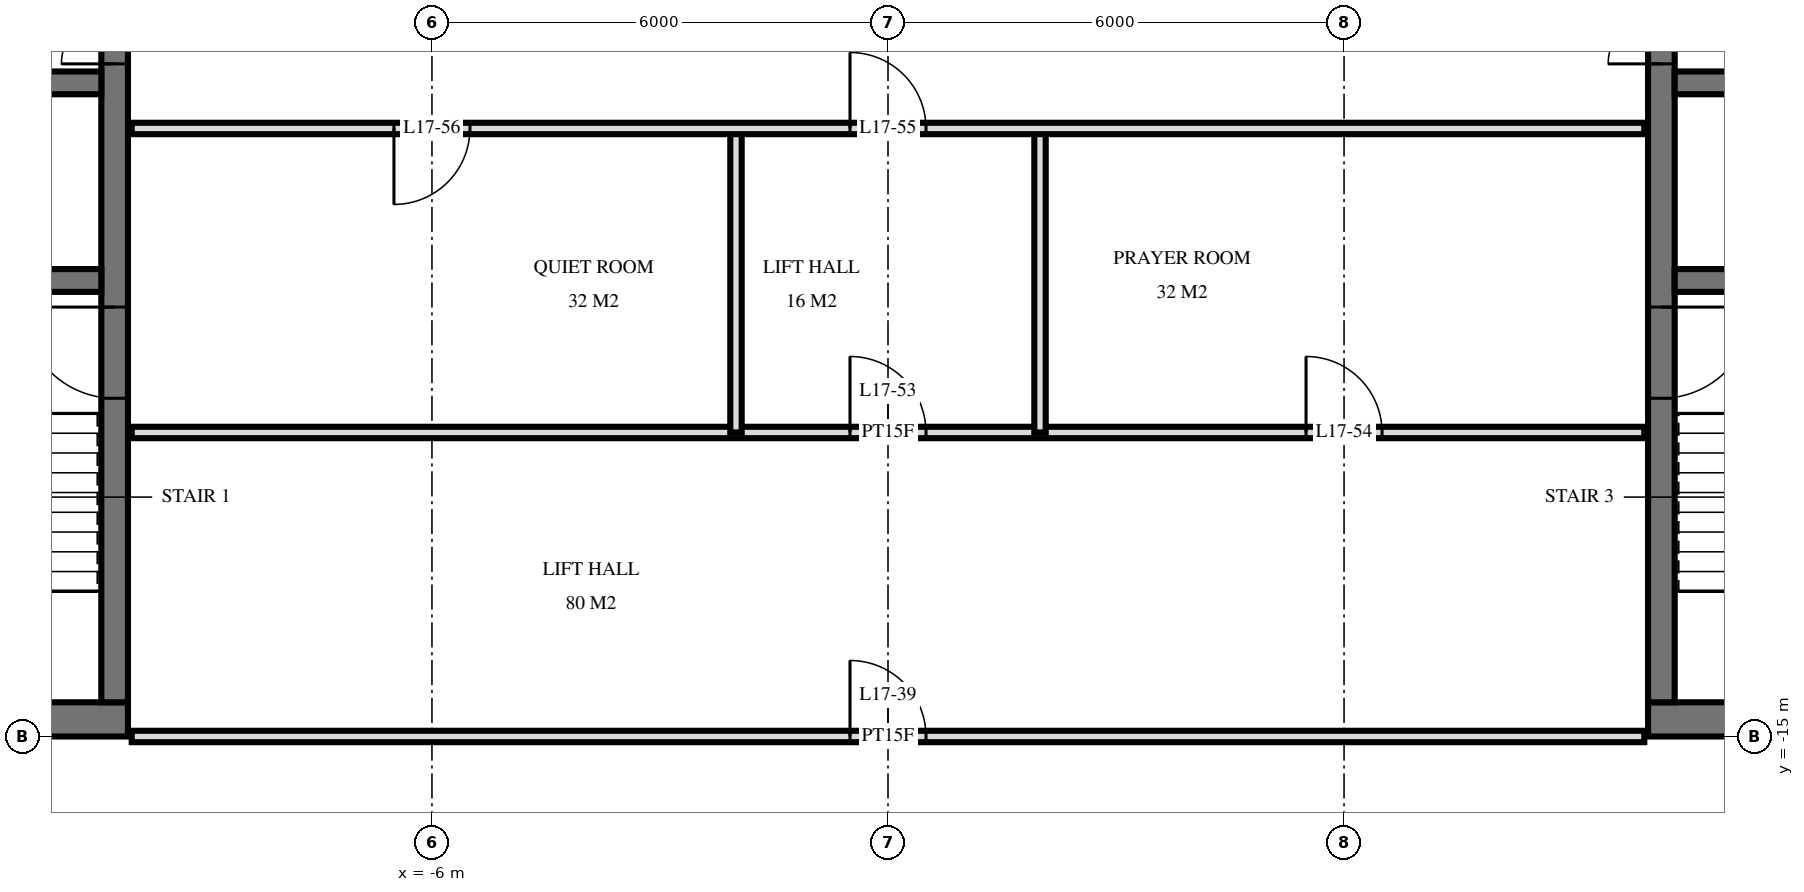
"""IFC4 building model, lengths in metres.
Left out: names, types, materials, properties, quantities, classifications, styles, units other than length and angle.
Written with IfcOpenShell. Run it as: python <this file> out.ifc"""

import sys

from ifc_helpers import new_model, si_unit, direction, frame, frame_2d, origin, place, context, subcontext, project, spatial, rectangle, extrude, element, fill, save


model = new_model("IFC4")
c1 = context("Model", 3, precision=1e-05, world=origin(), true_north=direction((0.0, 1.0)))
c2 = subcontext(c1, "Body", "Model", "MODEL_VIEW")
j1 = project(units=[si_unit("LENGTHUNIT", "METRE"), si_unit("PLANEANGLEUNIT", "RADIAN")], contexts=[c1])
p1 = place(None, origin())
s1 = spatial("IfcSite", under=j1, at=p1, CompositionType="ELEMENT")
p2 = place(p1, origin())
s2 = spatial("IfcBuilding", under=s1, at=p2, CompositionType="ELEMENT")
p3 = place(p2, frame((0.0, 0.0, 70.8)))
s3 = spatial("IfcBuildingStorey", under=s2, at=p3, CompositionType="ELEMENT", Elevation=70.8)
p4 = place(p3, frame((-29.5, -14.775, 0.0), z_axis=(0.0, 0.0, 1.0), x_axis=(1.0, 0.0, 0.0)))
e1 = element("IfcWall", 1, at=p4, inside=s3, PredefinedType="SHEAR", context=c2, shape_type="SweptSolid", body=[
    extrude(rectangle(XDim=19.5, YDim=0.45, at=frame_2d((9.75, 0.0))), origin(), (0.0, 0.0, 1.0), 3.6),
])
p5 = place(p4, frame((11.2, 0.0, 0.0)))
e2 = element("IfcOpeningElement", 2, at=p5, cuts=e1, PredefinedType="OPENING", context=c2, shape_type="SweptSolid", body=[
    extrude(rectangle(XDim=1.2, YDim=2.1, at=frame_2d((0.6, 1.05))), frame((0.0, 0.235, 0.0), z_axis=(0.0, -1.0, 0.0), x_axis=(1.0, 0.0, 0.0)), (0.0, 0.0, 1.0), 0.47),
])
p6 = place(p4, frame((14.25, 0.0, 0.0)))
e3 = element("IfcOpeningElement", 3, at=p6, cuts=e1, PredefinedType="OPENING", context=c2, shape_type="SweptSolid", body=[
    extrude(rectangle(XDim=1.1, YDim=2.1, at=frame_2d((0.55, 1.05))), frame((0.0, 0.235, 0.0), z_axis=(0.0, -1.0, 0.0), x_axis=(1.0, 0.0, 0.0)), (0.0, 0.0, 1.0), 0.47),
])
p7 = place(p4, frame((8.5, 0.0, 0.0)))
e4 = element("IfcOpeningElement", 4, at=p7, cuts=e1, PredefinedType="OPENING", context=c2, shape_type="SweptSolid", body=[
    extrude(rectangle(XDim=0.9, YDim=2.1, at=frame_2d((0.45, 1.05))), frame((0.0, 0.235, 0.0), z_axis=(0.0, -1.0, 0.0), x_axis=(1.0, 0.0, 0.0)), (0.0, 0.0, 1.0), 0.47),
])
p8 = place(p4, frame((6.05, 0.0, 0.0)))
e5 = element("IfcOpeningElement", 5, at=p8, cuts=e1, PredefinedType="OPENING", context=c2, shape_type="SweptSolid", body=[
    extrude(rectangle(XDim=1.0, YDim=2.1, at=frame_2d((0.5, 1.05))), frame((0.0, 0.235, 0.0), z_axis=(0.0, -1.0, 0.0), x_axis=(1.0, 0.0, 0.0)), (0.0, 0.0, 1.0), 0.47),
])
p9 = place(p4, frame((2.25, 0.0, 0.0)))
e6 = element("IfcOpeningElement", 6, at=p9, cuts=e1, PredefinedType="OPENING", context=c2, shape_type="SweptSolid", body=[
    extrude(rectangle(XDim=1.0, YDim=2.1, at=frame_2d((0.5, 1.05))), frame((0.0, 0.235, 0.0), z_axis=(0.0, -1.0, 0.0), x_axis=(1.0, 0.0, 0.0)), (0.0, 0.0, 1.0), 0.47),
])
p10 = place(p3, frame((-10.175, -14.55, 0.0), z_axis=(0.0, 0.0, 1.0), x_axis=(0.0, 1.0, 0.0)))
e7 = element("IfcWall", 7, at=p10, inside=s3, PredefinedType="SHEAR", context=c2, shape_type="SweptSolid", body=[
    extrude(rectangle(XDim=14.1, YDim=0.35, at=frame_2d((7.05, 0.0))), origin(), (0.0, 0.0, 1.0), 3.6),
])
p11 = place(p10, frame((8.4, 0.0, 0.0)))
e8 = element("IfcOpeningElement", 8, at=p11, cuts=e7, PredefinedType="OPENING", context=c2, shape_type="SweptSolid", body=[
    extrude(rectangle(XDim=1.4, YDim=2.4, at=frame_2d((0.7, 1.2))), frame((0.0, 0.185, 0.0), z_axis=(0.0, -1.0, 0.0), x_axis=(1.0, 0.0, 0.0)), (0.0, 0.0, 1.0), 0.37),
])
p12 = place(p10, frame((10.0, 0.0, 0.0)))
e9 = element("IfcOpeningElement", 9, at=p12, cuts=e7, PredefinedType="OPENING", context=c2, shape_type="SweptSolid", body=[
    extrude(rectangle(XDim=1.4, YDim=2.4, at=frame_2d((0.7, 1.2))), frame((0.0, 0.185, 0.0), z_axis=(0.0, -1.0, 0.0), x_axis=(1.0, 0.0, 0.0)), (0.0, 0.0, 1.0), 0.37),
])
p13 = place(p10, frame((4.0, 0.0, 0.0)))
e10 = element("IfcOpeningElement", 10, at=p13, cuts=e7, PredefinedType="OPENING", context=c2, shape_type="SweptSolid", body=[
    extrude(rectangle(XDim=1.2, YDim=2.1, at=frame_2d((0.6, 1.05))), frame((0.0, 0.185, 0.0), z_axis=(0.0, -1.0, 0.0), x_axis=(1.0, 0.0, 0.0)), (0.0, 0.0, 1.0), 0.37),
])
p14 = place(p3, frame((-29.05, -6.4, 0.0), z_axis=(0.0, 0.0, 1.0), x_axis=(1.0, 0.0, 0.0)))
e11 = element("IfcWall", 11, at=p14, inside=s3, PredefinedType="SHEAR", context=c2, shape_type="SweptSolid", body=[
    extrude(rectangle(XDim=18.7, YDim=0.3, at=frame_2d((9.35, 0.0))), origin(), (0.0, 0.0, 1.0), 3.6),
])
p15 = place(p14, frame((2.95, 0.0, 0.0)))
e12 = element("IfcOpeningElement", 12, at=p15, cuts=e11, PredefinedType="OPENING", context=c2, shape_type="SweptSolid", body=[
    extrude(rectangle(XDim=1.1, YDim=2.1, at=frame_2d((0.55, 1.05))), frame((0.0, 0.16, 0.0), z_axis=(0.0, -1.0, 0.0), x_axis=(1.0, 0.0, 0.0)), (0.0, 0.0, 1.0), 0.32),
])
p16 = place(p14, frame((0.55, 0.0, 0.0)))
e13 = element("IfcOpeningElement", 13, at=p16, cuts=e11, PredefinedType="OPENING", context=c2, shape_type="SweptSolid", body=[
    extrude(rectangle(XDim=1.1, YDim=2.1, at=frame_2d((0.55, 1.05))), frame((0.0, 0.16, 0.0), z_axis=(0.0, -1.0, 0.0), x_axis=(1.0, 0.0, 0.0)), (0.0, 0.0, 1.0), 0.32),
])
p17 = place(p14, frame((10.8, 0.0, 0.0)))
e14 = element("IfcOpeningElement", 14, at=p17, cuts=e11, PredefinedType="OPENING", context=c2, shape_type="SweptSolid", body=[
    extrude(rectangle(XDim=1.1, YDim=2.1, at=frame_2d((0.55, 1.05))), frame((0.0, 0.16, 0.0), z_axis=(0.0, -1.0, 0.0), x_axis=(1.0, 0.0, 0.0)), (0.0, 0.0, 1.0), 0.32),
])
p18 = place(p14, frame((5.6, 0.0, 0.0)))
e15 = element("IfcOpeningElement", 15, at=p18, cuts=e11, PredefinedType="OPENING", context=c2, shape_type="SweptSolid", body=[
    extrude(rectangle(XDim=1.0, YDim=2.1, at=frame_2d((0.5, 1.05))), frame((0.0, 0.16, 0.0), z_axis=(0.0, -1.0, 0.0), x_axis=(1.0, 0.0, 0.0)), (0.0, 0.0, 1.0), 0.32),
])
p19 = place(p3, frame((-29.05, -9.0, 0.0), z_axis=(0.0, 0.0, 1.0), x_axis=(1.0, 0.0, 0.0)))
e16 = element("IfcWall", 16, at=p19, inside=s3, PredefinedType="SHEAR", context=c2, shape_type="SweptSolid", body=[
    extrude(rectangle(XDim=18.7, YDim=0.3, at=frame_2d((9.35, 0.0))), origin(), (0.0, 0.0, 1.0), 3.6),
])
p20 = place(p19, frame((13.8, 0.0, 0.0)))
e17 = element("IfcOpeningElement", 17, at=p20, cuts=e16, PredefinedType="OPENING", context=c2, shape_type="SweptSolid", body=[
    extrude(rectangle(XDim=1.1, YDim=2.1, at=frame_2d((0.55, 1.05))), frame((0.0, 0.16, 0.0), z_axis=(0.0, -1.0, 0.0), x_axis=(1.0, 0.0, 0.0)), (0.0, 0.0, 1.0), 0.32),
])
p21 = place(p3, frame((10.0, -14.775, 0.0), z_axis=(0.0, 0.0, 1.0), x_axis=(1.0, 0.0, 0.0)))
e18 = element("IfcWall", 18, at=p21, inside=s3, PredefinedType="SHEAR", context=c2, shape_type="SweptSolid", body=[
    extrude(rectangle(XDim=19.5, YDim=0.45, at=frame_2d((9.75, 0.0))), origin(), (0.0, 0.0, 1.0), 3.6),
])
p22 = place(p21, frame((7.1, 0.0, 0.0)))
e19 = element("IfcOpeningElement", 19, at=p22, cuts=e18, PredefinedType="OPENING", context=c2, shape_type="SweptSolid", body=[
    extrude(rectangle(XDim=1.2, YDim=2.1, at=frame_2d((0.6, 1.05))), frame((0.0, 0.235, 0.0), z_axis=(0.0, -1.0, 0.0), x_axis=(1.0, 0.0, 0.0)), (0.0, 0.0, 1.0), 0.47),
])
p23 = place(p21, frame((4.15, 0.0, 0.0)))
e20 = element("IfcOpeningElement", 20, at=p23, cuts=e18, PredefinedType="OPENING", context=c2, shape_type="SweptSolid", body=[
    extrude(rectangle(XDim=1.1, YDim=2.1, at=frame_2d((0.55, 1.05))), frame((0.0, 0.235, 0.0), z_axis=(0.0, -1.0, 0.0), x_axis=(1.0, 0.0, 0.0)), (0.0, 0.0, 1.0), 0.47),
])
p24 = place(p21, frame((10.1, 0.0, 0.0)))
e21 = element("IfcOpeningElement", 21, at=p24, cuts=e18, PredefinedType="OPENING", context=c2, shape_type="SweptSolid", body=[
    extrude(rectangle(XDim=0.9, YDim=2.1, at=frame_2d((0.45, 1.05))), frame((0.0, 0.235, 0.0), z_axis=(0.0, -1.0, 0.0), x_axis=(1.0, 0.0, 0.0)), (0.0, 0.0, 1.0), 0.47),
])
p25 = place(p21, frame((12.45, 0.0, 0.0)))
e22 = element("IfcOpeningElement", 22, at=p25, cuts=e18, PredefinedType="OPENING", context=c2, shape_type="SweptSolid", body=[
    extrude(rectangle(XDim=1.0, YDim=2.1, at=frame_2d((0.5, 1.05))), frame((0.0, 0.235, 0.0), z_axis=(0.0, -1.0, 0.0), x_axis=(1.0, 0.0, 0.0)), (0.0, 0.0, 1.0), 0.47),
])
p26 = place(p21, frame((16.25, 0.0, 0.0)))
e23 = element("IfcOpeningElement", 23, at=p26, cuts=e18, PredefinedType="OPENING", context=c2, shape_type="SweptSolid", body=[
    extrude(rectangle(XDim=1.0, YDim=2.1, at=frame_2d((0.5, 1.05))), frame((0.0, 0.235, 0.0), z_axis=(0.0, -1.0, 0.0), x_axis=(1.0, 0.0, 0.0)), (0.0, 0.0, 1.0), 0.47),
])
p27 = place(p3, frame((10.175, -14.55, 0.0), z_axis=(0.0, 0.0, 1.0), x_axis=(0.0, 1.0, 0.0)))
e24 = element("IfcWall", 24, at=p27, inside=s3, PredefinedType="SHEAR", context=c2, shape_type="SweptSolid", body=[
    extrude(rectangle(XDim=14.1, YDim=0.35, at=frame_2d((7.05, 0.0))), origin(), (0.0, 0.0, 1.0), 3.6),
])
p28 = place(p27, frame((8.4, 0.0, 0.0)))
e25 = element("IfcOpeningElement", 25, at=p28, cuts=e24, PredefinedType="OPENING", context=c2, shape_type="SweptSolid", body=[
    extrude(rectangle(XDim=1.4, YDim=2.4, at=frame_2d((0.7, 1.2))), frame((0.0, 0.185, 0.0), z_axis=(0.0, -1.0, 0.0), x_axis=(1.0, 0.0, 0.0)), (0.0, 0.0, 1.0), 0.37),
])
p29 = place(p27, frame((10.0, 0.0, 0.0)))
e26 = element("IfcOpeningElement", 26, at=p29, cuts=e24, PredefinedType="OPENING", context=c2, shape_type="SweptSolid", body=[
    extrude(rectangle(XDim=1.4, YDim=2.4, at=frame_2d((0.7, 1.2))), frame((0.0, 0.185, 0.0), z_axis=(0.0, -1.0, 0.0), x_axis=(1.0, 0.0, 0.0)), (0.0, 0.0, 1.0), 0.37),
])
p30 = place(p27, frame((4.0, 0.0, 0.0)))
e27 = element("IfcOpeningElement", 27, at=p30, cuts=e24, PredefinedType="OPENING", context=c2, shape_type="SweptSolid", body=[
    extrude(rectangle(XDim=1.2, YDim=2.1, at=frame_2d((0.6, 1.05))), frame((0.0, 0.185, 0.0), z_axis=(0.0, -1.0, 0.0), x_axis=(1.0, 0.0, 0.0)), (0.0, 0.0, 1.0), 0.37),
])
p31 = place(p3, frame((10.35, -6.4, 0.0), z_axis=(0.0, 0.0, 1.0), x_axis=(1.0, 0.0, 0.0)))
e28 = element("IfcWall", 28, at=p31, inside=s3, PredefinedType="SHEAR", context=c2, shape_type="SweptSolid", body=[
    extrude(rectangle(XDim=18.7, YDim=0.3, at=frame_2d((9.35, 0.0))), origin(), (0.0, 0.0, 1.0), 3.6),
])
p32 = place(p31, frame((14.65, 0.0, 0.0)))
e29 = element("IfcOpeningElement", 29, at=p32, cuts=e28, PredefinedType="OPENING", context=c2, shape_type="SweptSolid", body=[
    extrude(rectangle(XDim=1.1, YDim=2.1, at=frame_2d((0.55, 1.05))), frame((0.0, 0.16, 0.0), z_axis=(0.0, -1.0, 0.0), x_axis=(1.0, 0.0, 0.0)), (0.0, 0.0, 1.0), 0.32),
])
p33 = place(p31, frame((17.05, 0.0, 0.0)))
e30 = element("IfcOpeningElement", 30, at=p33, cuts=e28, PredefinedType="OPENING", context=c2, shape_type="SweptSolid", body=[
    extrude(rectangle(XDim=1.1, YDim=2.1, at=frame_2d((0.55, 1.05))), frame((0.0, 0.16, 0.0), z_axis=(0.0, -1.0, 0.0), x_axis=(1.0, 0.0, 0.0)), (0.0, 0.0, 1.0), 0.32),
])
p34 = place(p31, frame((6.8, 0.0, 0.0)))
e31 = element("IfcOpeningElement", 31, at=p34, cuts=e28, PredefinedType="OPENING", context=c2, shape_type="SweptSolid", body=[
    extrude(rectangle(XDim=1.1, YDim=2.1, at=frame_2d((0.55, 1.05))), frame((0.0, 0.16, 0.0), z_axis=(0.0, -1.0, 0.0), x_axis=(1.0, 0.0, 0.0)), (0.0, 0.0, 1.0), 0.32),
])
p35 = place(p31, frame((12.1, 0.0, 0.0)))
e32 = element("IfcOpeningElement", 32, at=p35, cuts=e28, PredefinedType="OPENING", context=c2, shape_type="SweptSolid", body=[
    extrude(rectangle(XDim=1.0, YDim=2.1, at=frame_2d((0.5, 1.05))), frame((0.0, 0.16, 0.0), z_axis=(0.0, -1.0, 0.0), x_axis=(1.0, 0.0, 0.0)), (0.0, 0.0, 1.0), 0.32),
])
p36 = place(p3, frame((10.35, -9.0, 0.0), z_axis=(0.0, 0.0, 1.0), x_axis=(1.0, 0.0, 0.0)))
e33 = element("IfcWall", 33, at=p36, inside=s3, PredefinedType="SHEAR", context=c2, shape_type="SweptSolid", body=[
    extrude(rectangle(XDim=18.7, YDim=0.3, at=frame_2d((9.35, 0.0))), origin(), (0.0, 0.0, 1.0), 3.6),
])
p37 = place(p36, frame((3.8, 0.0, 0.0)))
e34 = element("IfcOpeningElement", 34, at=p37, cuts=e33, PredefinedType="OPENING", context=c2, shape_type="SweptSolid", body=[
    extrude(rectangle(XDim=1.1, YDim=2.1, at=frame_2d((0.55, 1.05))), frame((0.0, 0.16, 0.0), z_axis=(0.0, -1.0, 0.0), x_axis=(1.0, 0.0, 0.0)), (0.0, 0.0, 1.0), 0.32),
])
for number, where, z_axis, x_axis in (
    (35, (2.0, -11.0, 0.0), (0.0, 0.0, 1.0), (0.0, 1.0, 0.0)),
    (36, (-2.0, -11.0, 0.0), (0.0, 0.0, 1.0), (0.0, 1.0, 0.0)),
):
    element("IfcWall", number, at=place(p3, frame(where, z_axis=z_axis, x_axis=x_axis)), inside=s3, PredefinedType="PARTITIONING", context=c2, shape_type="SweptSolid", body=[
        extrude(rectangle(XDim=4.0, YDim=0.15, at=frame_2d((2.0, 0.0))), origin(), (0.0, 0.0, 1.0), 3.32),
    ])
p38 = place(p3, frame((-9.95, -15.0, 0.0), z_axis=(0.0, 0.0, 1.0), x_axis=(1.0, 0.0, 0.0)))
e37 = element("IfcWall", 37, at=p38, inside=s3, PredefinedType="PARTITIONING", context=c2, shape_type="SweptSolid", body=[
    extrude(rectangle(XDim=19.9, YDim=0.15, at=frame_2d((9.95, 0.0))), origin(), (0.0, 0.0, 1.0), 2.684),
])
p39 = place(p38, frame((9.45, 0.0, 0.0)))
e38 = element("IfcOpeningElement", 38, at=p39, cuts=e37, PredefinedType="OPENING", context=c2, shape_type="SweptSolid", body=[
    extrude(rectangle(XDim=1.0, YDim=2.1, at=frame_2d((0.5, 1.05))), frame((0.0, 0.085, 0.0), z_axis=(0.0, -1.0, 0.0), x_axis=(1.0, 0.0, 0.0)), (0.0, 0.0, 1.0), 0.17),
])
p40 = place(p3, frame((-9.95, -11.0, 0.0), z_axis=(0.0, 0.0, 1.0), x_axis=(1.0, 0.0, 0.0)))
e39 = element("IfcWall", 39, at=p40, inside=s3, PredefinedType="PARTITIONING", context=c2, shape_type="SweptSolid", body=[
    extrude(rectangle(XDim=19.9, YDim=0.15, at=frame_2d((9.95, 0.0))), origin(), (0.0, 0.0, 1.0), 3.32),
])
p41 = place(p40, frame((9.45, 0.0, 0.0)))
e40 = element("IfcOpeningElement", 40, at=p41, cuts=e39, PredefinedType="OPENING", context=c2, shape_type="SweptSolid", body=[
    extrude(rectangle(XDim=1.0, YDim=2.1, at=frame_2d((0.5, 1.05))), frame((0.0, 0.085, 0.0), z_axis=(0.0, -1.0, 0.0), x_axis=(1.0, 0.0, 0.0)), (0.0, 0.0, 1.0), 0.17),
])
p42 = place(p40, frame((15.45, 0.0, 0.0)))
e41 = element("IfcOpeningElement", 41, at=p42, cuts=e39, PredefinedType="OPENING", context=c2, shape_type="SweptSolid", body=[
    extrude(rectangle(XDim=1.0, YDim=2.1, at=frame_2d((0.5, 1.05))), frame((0.0, 0.085, 0.0), z_axis=(0.0, -1.0, 0.0), x_axis=(1.0, 0.0, 0.0)), (0.0, 0.0, 1.0), 0.17),
])
p43 = place(p3, frame((-9.95, -7.0, 0.0), z_axis=(0.0, 0.0, 1.0), x_axis=(1.0, 0.0, 0.0)))
e42 = element("IfcWall", 42, at=p43, inside=s3, PredefinedType="PARTITIONING", context=c2, shape_type="SweptSolid", body=[
    extrude(rectangle(XDim=19.9, YDim=0.15, at=frame_2d((9.95, 0.0))), origin(), (0.0, 0.0, 1.0), 3.32),
])
p44 = place(p43, frame((9.45, 0.0, 0.0)))
e43 = element("IfcOpeningElement", 43, at=p44, cuts=e42, PredefinedType="OPENING", context=c2, shape_type="SweptSolid", body=[
    extrude(rectangle(XDim=1.0, YDim=2.1, at=frame_2d((0.5, 1.05))), frame((0.0, 0.085, 0.0), z_axis=(0.0, -1.0, 0.0), x_axis=(1.0, 0.0, 0.0)), (0.0, 0.0, 1.0), 0.17),
])
p45 = place(p43, frame((3.45, 0.0, 0.0)))
e44 = element("IfcOpeningElement", 44, at=p45, cuts=e42, PredefinedType="OPENING", context=c2, shape_type="SweptSolid", body=[
    extrude(rectangle(XDim=1.0, YDim=2.1, at=frame_2d((0.5, 1.05))), frame((0.0, 0.085, 0.0), z_axis=(0.0, -1.0, 0.0), x_axis=(1.0, 0.0, 0.0)), (0.0, 0.0, 1.0), 0.17),
])
p46 = place(p11, origin())
e45 = element("IfcDoor", 45, at=p46, inside=s3, OperationType="DOUBLE_DOOR_SINGLE_SWING", PredefinedType="DOOR", context=c2, shape_type="SweptSolid", body=[
    extrude(rectangle(XDim=1.4, YDim=2.4, at=frame_2d((0.7, 1.2))), frame((0.0, 0.025, 0.0), z_axis=(0.0, -1.0, 0.0), x_axis=(1.0, 0.0, 0.0)), (0.0, 0.0, 1.0), 0.05),
])
fill(e8, e45)
p47 = place(p13, origin())
e46 = element("IfcDoor", 46, at=p47, inside=s3, OperationType="SINGLE_SWING_LEFT", PredefinedType="DOOR", context=c2, shape_type="SweptSolid", body=[
    extrude(rectangle(XDim=1.2, YDim=2.1, at=frame_2d((0.6, 1.05))), frame((0.0, 0.025, 0.0), z_axis=(0.0, -1.0, 0.0), x_axis=(1.0, 0.0, 0.0)), (0.0, 0.0, 1.0), 0.05),
])
fill(e10, e46)
p48 = place(p28, origin())
e47 = element("IfcDoor", 47, at=p48, inside=s3, OperationType="DOUBLE_DOOR_SINGLE_SWING", PredefinedType="DOOR", context=c2, shape_type="SweptSolid", body=[
    extrude(rectangle(XDim=1.4, YDim=2.4, at=frame_2d((0.7, 1.2))), frame((0.0, 0.025, 0.0), z_axis=(0.0, -1.0, 0.0), x_axis=(1.0, 0.0, 0.0)), (0.0, 0.0, 1.0), 0.05),
])
fill(e25, e47)
p49 = place(p30, frame((0.6, 0.0, 0.0), z_axis=(0.0, 0.0, 1.0), x_axis=(-1.0, 0.0, 0.0)))
e48 = element("IfcDoor", 48, at=p49, inside=s3, OperationType="SINGLE_SWING_RIGHT", PredefinedType="DOOR", context=c2, shape_type="SweptSolid", body=[
    extrude(rectangle(XDim=1.2, YDim=2.1, at=frame_2d((0.0, 1.05))), frame((0.0, -0.025, 0.0), z_axis=(0.0, 1.0, 0.0), x_axis=(-1.0, 0.0, 0.0)), (0.0, 0.0, 1.0), 0.05),
])
fill(e27, e48)
p50 = place(p39, origin())
e49 = element("IfcDoor", 49, at=p50, inside=s3, OperationType="SINGLE_SWING_RIGHT", PredefinedType="DOOR", context=c2, shape_type="SweptSolid", body=[
    extrude(rectangle(XDim=1.0, YDim=2.1, at=frame_2d((0.5, 1.05))), frame((0.0, 0.025, 0.0), z_axis=(0.0, -1.0, 0.0), x_axis=(1.0, 0.0, 0.0)), (0.0, 0.0, 1.0), 0.05),
])
fill(e38, e49)
p51 = place(p41, origin())
e50 = element("IfcDoor", 50, at=p51, inside=s3, OperationType="SINGLE_SWING_RIGHT", PredefinedType="DOOR", context=c2, shape_type="SweptSolid", body=[
    extrude(rectangle(XDim=1.0, YDim=2.1, at=frame_2d((0.5, 1.05))), frame((0.0, 0.025, 0.0), z_axis=(0.0, -1.0, 0.0), x_axis=(1.0, 0.0, 0.0)), (0.0, 0.0, 1.0), 0.05),
])
fill(e40, e50)
p52 = place(p42, origin())
e51 = element("IfcDoor", 51, at=p52, inside=s3, OperationType="SINGLE_SWING_RIGHT", PredefinedType="DOOR", context=c2, shape_type="SweptSolid", body=[
    extrude(rectangle(XDim=1.0, YDim=2.1, at=frame_2d((0.5, 1.05))), frame((0.0, 0.025, 0.0), z_axis=(0.0, -1.0, 0.0), x_axis=(1.0, 0.0, 0.0)), (0.0, 0.0, 1.0), 0.05),
])
fill(e41, e51)
p53 = place(p44, origin())
e52 = element("IfcDoor", 52, at=p53, inside=s3, OperationType="SINGLE_SWING_RIGHT", PredefinedType="DOOR", context=c2, shape_type="SweptSolid", body=[
    extrude(rectangle(XDim=1.0, YDim=2.1, at=frame_2d((0.5, 1.05))), frame((0.0, 0.025, 0.0), z_axis=(0.0, -1.0, 0.0), x_axis=(1.0, 0.0, 0.0)), (0.0, 0.0, 1.0), 0.05),
])
fill(e43, e52)
p54 = place(p45, frame((0.5, 0.0, 0.0), z_axis=(0.0, 0.0, 1.0), x_axis=(-1.0, 0.0, 0.0)))
e53 = element("IfcDoor", 53, at=p54, inside=s3, OperationType="SINGLE_SWING_LEFT", PredefinedType="DOOR", context=c2, shape_type="SweptSolid", body=[
    extrude(rectangle(XDim=1.0, YDim=2.1, at=frame_2d((0.0, 1.05))), frame((0.0, -0.025, 0.0), z_axis=(0.0, 1.0, 0.0), x_axis=(-1.0, 0.0, 0.0)), (0.0, 0.0, 1.0), 0.05),
])
fill(e44, e53)
save(model, sys.argv[1])
